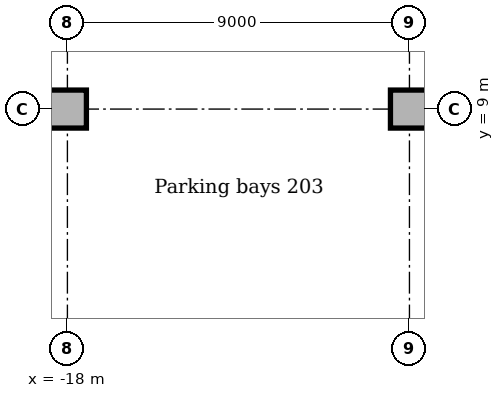
"""IFC4 building model, lengths in metres.
Left out: names, types, materials, properties, quantities, classifications, styles, units other than length and angle.
Written with IfcOpenShell. Run it as: python <this file> out.ifc"""

import sys

from ifc_helpers import new_model, si_unit, direction, frame, origin, origin_2d, place, context, subcontext, project, spatial, rectangle, extrude, element, save


model = new_model("IFC4")
c1 = context("Model", 3, precision=1e-05, world=origin(), true_north=direction((0.0, 1.0)))
c2 = subcontext(c1, "Body", "Model", "MODEL_VIEW")
j1 = project(units=[si_unit("LENGTHUNIT", "METRE"), si_unit("PLANEANGLEUNIT", "RADIAN")], contexts=[c1])
p1 = place(None, origin())
s1 = spatial("IfcSite", under=j1, at=p1, CompositionType="ELEMENT")
p2 = place(p1, origin())
s2 = spatial("IfcBuilding", under=s1, at=p2, CompositionType="ELEMENT")
p3 = place(p2, frame((0.0, 0.0, -9.5)))
s3 = spatial("IfcBuildingStorey", under=s2, at=p3, CompositionType="ELEMENT", Elevation=-9.5)
for number, where, z_axis, x_axis in (
    (1, (-18.0, 9.0, 0.0), (0.0, 0.0, 1.0), (1.0, 0.0, 0.0)),
    (2, (-9.0, 9.0, 0.0), (0.0, 0.0, 1.0), (1.0, 0.0, 0.0)),
):
    element("IfcColumn", number, at=place(p3, frame(where, z_axis=z_axis, x_axis=x_axis)), inside=s3, PredefinedType="COLUMN", context=c2, shape_type="SweptSolid", body=[
        extrude(rectangle(XDim=1.0, YDim=1.0, at=origin_2d()), origin(), (0.0, 0.0, 1.0), 4.15),
    ])
save(model, sys.argv[1])
